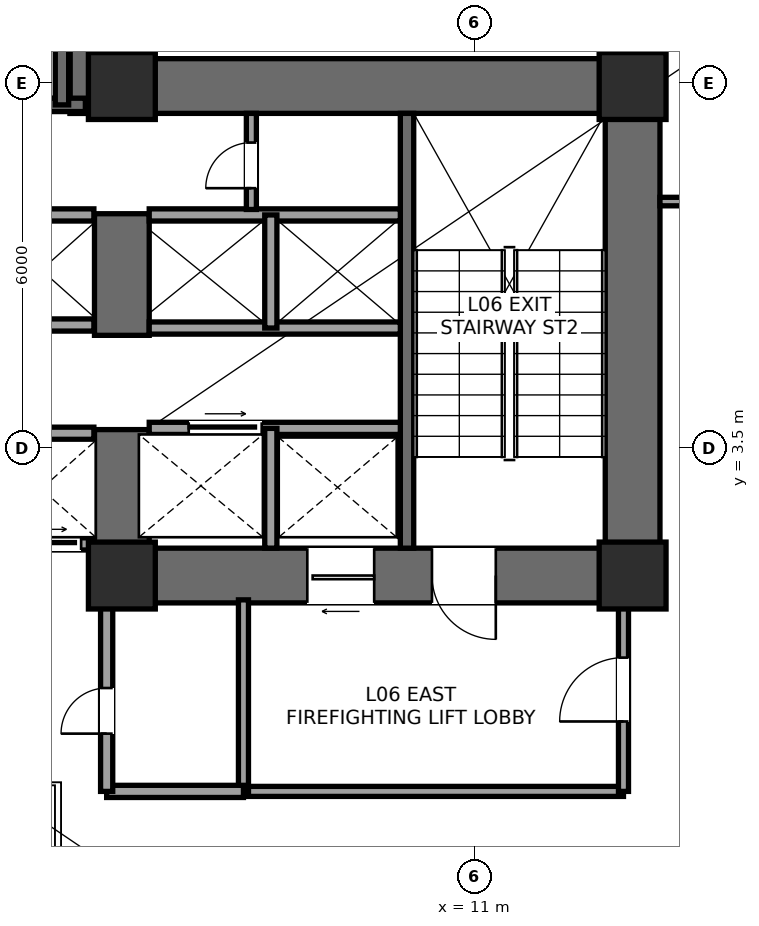
"""IFC4 building model, lengths in metres.
Left out: names, types, materials, properties, quantities, classifications, styles, units other than length and angle.
Written with IfcOpenShell. Run it as: python <this file> out.ifc"""

import sys

from ifc_helpers import new_model, si_unit, direction, frame, frame_2d, origin, origin_2d, place, context, subcontext, project, spatial, rectangle, extrude, element, fill, save


model = new_model("IFC4")
c1 = context("Model", 3, precision=1e-05, world=origin(), true_north=direction((0.0, 1.0)))
c2 = subcontext(c1, "Body", "Model", "MODEL_VIEW")
j1 = project(units=[si_unit("LENGTHUNIT", "METRE"), si_unit("PLANEANGLEUNIT", "RADIAN")], contexts=[c1])
p1 = place(None, origin())
s1 = spatial("IfcSite", under=j1, at=p1, CompositionType="ELEMENT")
p2 = place(p1, origin())
s2 = spatial("IfcBuilding", under=s1, at=p2, CompositionType="ELEMENT")
p3 = place(p2, frame((0.0, 0.0, 27.0)))
s3 = spatial("IfcBuildingStorey", under=s2, at=p3, CompositionType="ELEMENT", Elevation=27.0)
p4 = place(p3, frame((13.6, 0.95, 0.0), z_axis=(0.0, 0.0, 1.0), x_axis=(0.0, 1.0, 0.0)))
e1 = element("IfcWall", 1, at=p4, inside=s3, PredefinedType="SHEAR", context=c2, shape_type="SweptSolid", body=[
    extrude(rectangle(XDim=8.95, YDim=0.9, at=frame_2d((4.475, 0.0))), origin(), (0.0, 0.0, 1.0), 3.6),
])
p5 = place(p3, frame((4.35, 9.45, 0.0), z_axis=(0.0, 0.0, 1.0), x_axis=(1.0, 0.0, 0.0)))
e2 = element("IfcWall", 2, at=p5, inside=s3, PredefinedType="SHEAR", context=c2, shape_type="SweptSolid", body=[
    extrude(rectangle(XDim=9.7, YDim=0.9, at=frame_2d((4.85, 0.0))), origin(), (0.0, 0.0, 1.0), 3.6),
])
p6 = place(p3, frame((14.05, 1.4, 0.0), z_axis=(0.0, 0.0, 1.0), x_axis=(-1.0, 0.0, 0.0)))
e3 = element("IfcWall", 3, at=p6, inside=s3, PredefinedType="SHEAR", context=c2, shape_type="SweptSolid", body=[
    extrude(rectangle(XDim=9.3, YDim=0.9, at=frame_2d((4.65, 0.0))), origin(), (0.0, 0.0, 1.0), 3.6),
])
p7 = place(p6, frame((2.7, 0.0, 0.0)))
e4 = element("IfcOpeningElement", 4, at=p7, cuts=e3, PredefinedType="OPENING", context=c2, shape_type="SweptSolid", body=[
    extrude(rectangle(XDim=1.05, YDim=2.15, at=frame_2d((0.525, 1.075))), frame((0.0, 0.46, 0.0), z_axis=(0.0, -1.0, 0.0), x_axis=(1.0, 0.0, 0.0)), (0.0, 0.0, 1.0), 0.92),
])
p8 = place(p6, frame((4.7, 0.0, 0.0)))
e5 = element("IfcOpeningElement", 5, at=p8, cuts=e3, PredefinedType="OPENING", context=c2, shape_type="SweptSolid", body=[
    extrude(rectangle(XDim=1.1, YDim=2.2, at=frame_2d((0.55, 1.1))), frame((0.0, 0.46, 0.0), z_axis=(0.0, -1.0, 0.0), x_axis=(1.0, 0.0, 0.0)), (0.0, 0.0, 1.0), 0.92),
])
p9 = place(p3, frame((5.2, 0.95, 0.0), z_axis=(0.0, 0.0, 1.0), x_axis=(0.0, 1.0, 0.0)))
e6 = element("IfcWall", 6, at=p9, inside=s3, PredefinedType="SHEAR", context=c2, shape_type="SweptSolid", body=[
    extrude(rectangle(XDim=2.85, YDim=0.9, at=frame_2d((1.425, 0.0))), origin(), (0.0, 0.0, 1.0), 3.6),
])
p10 = place(p3, frame((5.2, 5.35, 0.0), z_axis=(0.0, 0.0, 1.0), x_axis=(0.0, 1.0, 0.0)))
e7 = element("IfcWall", 7, at=p10, inside=s3, PredefinedType="SHEAR", context=c2, shape_type="SweptSolid", body=[
    extrude(rectangle(XDim=2.0, YDim=0.9, at=frame_2d((1.0, 0.0))), origin(), (0.0, 0.0, 1.0), 3.6),
])
p11 = place(p3, frame((9.89, 1.85, 0.0), z_axis=(0.0, 0.0, 1.0), x_axis=(0.0, 1.0, 0.0)))
e8 = element("IfcWall", 8, at=p11, inside=s3, PredefinedType="SHEAR", context=c2, shape_type="SweptSolid", body=[
    extrude(rectangle(XDim=7.15, YDim=0.22, at=frame_2d((3.575, 0.0))), origin(), (0.0, 0.0, 1.0), 3.6),
])
p12 = place(p3, frame((4.8, 9.0, 0.0), z_axis=(0.0, 0.0, 1.0), x_axis=(0.0, 1.0, 0.0)))
e9 = element("IfcWall", 9, at=p12, inside=s3, PredefinedType="SHEAR", context=c2, shape_type="SweptSolid", body=[
    extrude(rectangle(XDim=4.3, YDim=0.9, at=frame_2d((2.15, 0.0))), origin(), (0.0, 0.0, 1.0), 3.6),
])
p13 = place(p3, frame((-4.7, 9.14, 0.0), z_axis=(0.0, 0.0, 1.0), x_axis=(1.0, 0.0, 0.0)))
e10 = element("IfcWall", 10, at=p13, inside=s3, PredefinedType="SHEAR", context=c2, shape_type="SweptSolid", body=[
    extrude(rectangle(XDim=9.3, YDim=0.22, at=frame_2d((4.65, 0.0))), origin(), (0.0, 0.0, 1.0), 3.6),
])
p14 = place(p13, frame((1.15, 0.0, 0.0)))
e11 = element("IfcOpeningElement", 11, at=p14, cuts=e10, PredefinedType="OPENING", context=c2, shape_type="SweptSolid", body=[
    extrude(rectangle(XDim=1.05, YDim=2.15, at=frame_2d((0.525, 1.075))), frame((0.0, 0.12, 0.0), z_axis=(0.0, -1.0, 0.0), x_axis=(1.0, 0.0, 0.0)), (0.0, 0.0, 1.0), 0.24),
])
p15 = place(p3, frame((4.215, 9.14, 0.0), z_axis=(0.0, 0.0, 1.0), x_axis=(0.0, 1.0, 0.0)))
e12 = element("IfcWall", 12, at=p15, inside=s3, PredefinedType="SHEAR", context=c2, shape_type="SweptSolid", body=[
    extrude(rectangle(XDim=3.26, YDim=0.22, at=frame_2d((1.63, 0.0))), origin(), (0.0, 0.0, 1.0), 3.6),
])
for number, where, z_axis, x_axis in (
    (13, (5.2, 1.4, 0.0), (0.0, 0.0, 1.0), (1.0, 0.0, 0.0)),
    (14, (5.2, 9.45, 0.0), (0.0, 0.0, 1.0), (1.0, 0.0, 0.0)),
    (15, (13.6, 1.4, 0.0), (0.0, 0.0, 1.0), (1.0, 0.0, 0.0)),
    (16, (13.6, 9.45, 0.0), (0.0, 0.0, 1.0), (1.0, 0.0, 0.0)),
):
    element("IfcColumn", number, at=place(p3, frame(where, z_axis=z_axis, x_axis=x_axis)), inside=s3, PredefinedType="COLUMN", context=c2, shape_type="SweptSolid", body=[
        extrude(rectangle(XDim=1.1, YDim=1.1, at=origin_2d()), origin(), (0.0, 0.0, 1.0), 3.6),
    ])
p16 = place(p3, frame((7.2, -2.15, 0.0), z_axis=(0.0, 0.0, 1.0), x_axis=(1.0, 0.0, 0.0)))
e17 = element("IfcWall", 17, at=p16, inside=s3, PredefinedType="PARTITIONING", context=c2, shape_type="SweptSolid", body=[
    extrude(rectangle(XDim=6.25, YDim=0.165, at=frame_2d((3.125, 0.0))), origin(), (0.0, 0.0, 1.0), 2.853),
])
p17 = place(p3, frame((7.2, -2.15, 0.0), z_axis=(0.0, 0.0, 1.0), x_axis=(0.0, 1.0, 0.0)))
e18 = element("IfcWall", 18, at=p17, inside=s3, PredefinedType="PARTITIONING", context=c2, shape_type="SweptSolid", body=[
    extrude(rectangle(XDim=3.15, YDim=0.165, at=frame_2d((1.575, 0.0))), origin(), (0.0, 0.0, 1.0), 2.853),
])
p18 = place(p3, frame((13.45, -2.15, 0.0), z_axis=(0.0, 0.0, 1.0), x_axis=(0.0, 1.0, 0.0)))
e19 = element("IfcWall", 19, at=p18, inside=s3, PredefinedType="PARTITIONING", context=c2, shape_type="SweptSolid", body=[
    extrude(rectangle(XDim=3.15, YDim=0.165, at=frame_2d((1.575, 0.0))), origin(), (0.0, 0.0, 1.0), 2.853),
])
p19 = place(p18, frame((1.15, 0.0, 0.0)))
e20 = element("IfcOpeningElement", 20, at=p19, cuts=e19, PredefinedType="OPENING", context=c2, shape_type="SweptSolid", body=[
    extrude(rectangle(XDim=1.05, YDim=2.15, at=frame_2d((0.525, 1.075))), frame((0.0, 0.093, 0.0), z_axis=(0.0, -1.0, 0.0), x_axis=(1.0, 0.0, 0.0)), (0.0, 0.0, 1.0), 0.185),
])
p20 = place(p3, frame((4.95, -2.15, 0.0), z_axis=(0.0, 0.0, 1.0), x_axis=(1.0, 0.0, 0.0)))
e21 = element("IfcWall", 21, at=p20, inside=s3, PredefinedType="SOLIDWALL", context=c2, shape_type="SweptSolid", body=[
    extrude(rectangle(XDim=2.25, YDim=0.2, at=frame_2d((1.125, 0.0))), origin(), (0.0, 0.0, 1.0), 3.4),
])
p21 = place(p3, frame((4.95, -2.15, 0.0), z_axis=(0.0, 0.0, 1.0), x_axis=(0.0, 1.0, 0.0)))
e22 = element("IfcWall", 22, at=p21, inside=s3, PredefinedType="SOLIDWALL", context=c2, shape_type="SweptSolid", body=[
    extrude(rectangle(XDim=3.15, YDim=0.2, at=frame_2d((1.575, 0.0))), origin(), (0.0, 0.0, 1.0), 2.853),
])
p22 = place(p21, frame((0.95, 0.0, 0.0)))
e23 = element("IfcOpeningElement", 23, at=p22, cuts=e22, PredefinedType="OPENING", context=c2, shape_type="SweptSolid", body=[
    extrude(rectangle(XDim=0.75, YDim=2.1, at=frame_2d((0.375, 1.05))), frame((0.0, 0.11, 0.0), z_axis=(0.0, -1.0, 0.0), x_axis=(1.0, 0.0, 0.0)), (0.0, 0.0, 1.0), 0.22),
])
p23 = place(p3, frame((5.65, 3.82, 0.0), z_axis=(0.0, 0.0, 1.0), x_axis=(1.0, 0.0, 0.0)))
e24 = element("IfcWall", 24, at=p23, inside=s3, PredefinedType="SOLIDWALL", context=c2, shape_type="SweptSolid", body=[
    extrude(rectangle(XDim=4.13, YDim=0.2, at=frame_2d((2.065, 0.0))), origin(), (0.0, 0.0, 1.0), 3.4),
])
p24 = place(p23, frame((0.65, 0.0, 0.0)))
e25 = element("IfcOpeningElement", 25, at=p24, cuts=e24, PredefinedType="OPENING", context=c2, shape_type="SweptSolid", body=[
    extrude(rectangle(XDim=1.2, YDim=2.2, at=frame_2d((0.6, 1.1))), frame((0.0, 0.11, 0.0), z_axis=(0.0, -1.0, 0.0), x_axis=(1.0, 0.0, 0.0)), (0.0, 0.0, 1.0), 0.22),
])
p25 = place(p3, frame((7.65, 1.85, 0.0), z_axis=(0.0, 0.0, 1.0), x_axis=(0.0, 1.0, 0.0)))
e26 = element("IfcWall", 26, at=p25, inside=s3, PredefinedType="SOLIDWALL", context=c2, shape_type="SweptSolid", body=[
    extrude(rectangle(XDim=1.97, YDim=0.2, at=frame_2d((0.985, 0.0))), origin(), (0.0, 0.0, 1.0), 3.4),
])
for number, where, z_axis, x_axis in (
    (27, (5.65, 5.47, 0.0), (0.0, 0.0, 1.0), (1.0, 0.0, 0.0)),
    (28, (5.65, 7.33, 0.0), (0.0, 0.0, 1.0), (1.0, 0.0, 0.0)),
):
    element("IfcWall", number, at=place(p3, frame(where, z_axis=z_axis, x_axis=x_axis)), inside=s3, PredefinedType="SOLIDWALL", context=c2, shape_type="SweptSolid", body=[
        extrude(rectangle(XDim=4.13, YDim=0.2, at=frame_2d((2.065, 0.0))), origin(), (0.0, 0.0, 1.0), 3.4),
    ])
p26 = place(p3, frame((7.65, 5.47, 0.0), z_axis=(0.0, 0.0, 1.0), x_axis=(0.0, 1.0, 0.0)))
e29 = element("IfcWall", 29, at=p26, inside=s3, PredefinedType="SOLIDWALL", context=c2, shape_type="SweptSolid", body=[
    extrude(rectangle(XDim=1.86, YDim=0.2, at=frame_2d((0.93, 0.0))), origin(), (0.0, 0.0, 1.0), 3.4),
])
p27 = place(p3, frame((0.88, 1.92, 0.0), z_axis=(0.0, 0.0, 1.0), x_axis=(1.0, 0.0, 0.0)))
e30 = element("IfcWall", 30, at=p27, inside=s3, PredefinedType="SOLIDWALL", context=c2, shape_type="SweptSolid", body=[
    extrude(rectangle(XDim=3.86, YDim=0.2, at=frame_2d((1.93, 0.0))), origin(), (0.0, 0.0, 1.0), 2.39),
])
p28 = place(p27, frame((0.55, 0.0, 0.0)))
e31 = element("IfcOpeningElement", 31, at=p28, cuts=e30, PredefinedType="OPENING", context=c2, shape_type="SweptSolid", body=[
    extrude(rectangle(XDim=1.1, YDim=2.2, at=frame_2d((0.55, 1.1))), frame((0.0, 0.11, 0.0), z_axis=(0.0, -1.0, 0.0), x_axis=(1.0, 0.0, 0.0)), (0.0, 0.0, 1.0), 0.22),
])
p29 = place(p27, frame((2.55, 0.0, 0.0)))
e32 = element("IfcOpeningElement", 32, at=p29, cuts=e30, PredefinedType="OPENING", context=c2, shape_type="SweptSolid", body=[
    extrude(rectangle(XDim=1.1, YDim=2.2, at=frame_2d((0.55, 1.1))), frame((0.0, 0.11, 0.0), z_axis=(0.0, -1.0, 0.0), x_axis=(1.0, 0.0, 0.0)), (0.0, 0.0, 1.0), 0.22),
])
for number, where, z_axis, x_axis in (
    (33, (0.88, 3.74, 0.0), (0.0, 0.0, 1.0), (1.0, 0.0, 0.0)),
    (34, (0.88, 5.52, 0.0), (0.0, 0.0, 1.0), (1.0, 0.0, 0.0)),
    (35, (0.88, 7.33, 0.0), (0.0, 0.0, 1.0), (1.0, 0.0, 0.0)),
):
    element("IfcWall", number, at=place(p3, frame(where, z_axis=z_axis, x_axis=x_axis)), inside=s3, PredefinedType="SOLIDWALL", context=c2, shape_type="SweptSolid", body=[
        extrude(rectangle(XDim=3.86, YDim=0.2, at=frame_2d((1.93, 0.0))), origin(), (0.0, 0.0, 1.0), 3.4),
    ])
p30 = place(p3, frame((7.33, 7.42, 0.0), z_axis=(0.0, 0.0, 1.0), x_axis=(0.0, 1.0, 0.0)))
e36 = element("IfcWall", 36, at=p30, inside=s3, PredefinedType="PARTITIONING", context=c2, shape_type="SweptSolid", body=[
    extrude(rectangle(XDim=1.58, YDim=0.165, at=frame_2d((0.79, 0.0))), origin(), (0.0, 0.0, 1.0), 3.4),
])
p31 = place(p30, frame((0.35, 0.0, 0.0)))
e37 = element("IfcOpeningElement", 37, at=p31, cuts=e36, PredefinedType="OPENING", context=c2, shape_type="SweptSolid", body=[
    extrude(rectangle(XDim=0.75, YDim=2.1, at=frame_2d((0.375, 1.05))), frame((0.0, 0.093, 0.0), z_axis=(0.0, -1.0, 0.0), x_axis=(1.0, 0.0, 0.0)), (0.0, 0.0, 1.0), 0.185),
])
p32 = place(p3, frame((14.05, 7.55, 0.0), z_axis=(0.0, 0.0, 1.0), x_axis=(1.0, 0.0, 0.0)))
e38 = element("IfcWall", 38, at=p32, inside=s3, PredefinedType="PARTITIONING", context=c2, shape_type="SweptSolid", body=[
    extrude(rectangle(XDim=9.052, YDim=0.14, at=frame_2d((4.526, 0.0))), origin(), (0.0, 0.0, 1.0), 3.4),
])
p33 = place(p32, frame((1.2, 0.0, 0.0)))
e39 = element("IfcOpeningElement", 39, at=p33, cuts=e38, PredefinedType="OPENING", context=c2, shape_type="SweptSolid", body=[
    extrude(rectangle(XDim=0.92, YDim=2.15, at=frame_2d((0.46, 1.075))), frame((0.0, 0.08, 0.0), z_axis=(0.0, -1.0, 0.0), x_axis=(1.0, 0.0, 0.0)), (0.0, 0.0, 1.0), 0.16),
])
p34 = place(p7, origin())
e40 = element("IfcDoor", 40, at=p34, inside=s3, OperationType="SINGLE_SWING_LEFT", PredefinedType="DOOR", context=c2, shape_type="SweptSolid", body=[
    extrude(rectangle(XDim=1.05, YDim=2.15, at=frame_2d((0.525, 1.075))), frame((0.0, 0.025, 0.0), z_axis=(0.0, -1.0, 0.0), x_axis=(1.0, 0.0, 0.0)), (0.0, 0.0, 1.0), 0.05),
])
fill(e4, e40)
p35 = place(p19, origin())
e41 = element("IfcDoor", 41, at=p35, inside=s3, OperationType="SINGLE_SWING_LEFT", PredefinedType="DOOR", context=c2, shape_type="SweptSolid", body=[
    extrude(rectangle(XDim=1.05, YDim=2.15, at=frame_2d((0.525, 1.075))), frame((0.0, 0.025, 0.0), z_axis=(0.0, -1.0, 0.0), x_axis=(1.0, 0.0, 0.0)), (0.0, 0.0, 1.0), 0.05),
])
fill(e20, e41)
p36 = place(p22, origin())
e42 = element("IfcDoor", 42, at=p36, inside=s3, OperationType="SINGLE_SWING_LEFT", PredefinedType="DOOR", context=c2, shape_type="SweptSolid", body=[
    extrude(rectangle(XDim=0.75, YDim=2.1, at=frame_2d((0.375, 1.05))), frame((0.0, 0.025, 0.0), z_axis=(0.0, -1.0, 0.0), x_axis=(1.0, 0.0, 0.0)), (0.0, 0.0, 1.0), 0.05),
])
fill(e23, e42)
p37 = place(p8, origin())
e43 = element("IfcDoor", 43, at=p37, inside=s3, OperationType="SLIDING_TO_LEFT", PredefinedType="DOOR", context=c2, shape_type="SweptSolid", body=[
    extrude(rectangle(XDim=1.1, YDim=2.2, at=frame_2d((0.55, 1.1))), frame((0.0, 0.025, 0.0), z_axis=(0.0, -1.0, 0.0), x_axis=(1.0, 0.0, 0.0)), (0.0, 0.0, 1.0), 0.05),
])
fill(e5, e43)
p38 = place(p24, origin())
e44 = element("IfcDoor", 44, at=p38, inside=s3, OperationType="SLIDING_TO_RIGHT", PredefinedType="DOOR", context=c2, shape_type="SweptSolid", body=[
    extrude(rectangle(XDim=1.2, YDim=2.2, at=frame_2d((0.6, 1.1))), frame((0.0, 0.025, 0.0), z_axis=(0.0, -1.0, 0.0), x_axis=(1.0, 0.0, 0.0)), (0.0, 0.0, 1.0), 0.05),
])
fill(e25, e44)
p39 = place(p29, origin())
e45 = element("IfcDoor", 45, at=p39, inside=s3, OperationType="SLIDING_TO_LEFT", PredefinedType="DOOR", context=c2, shape_type="SweptSolid", body=[
    extrude(rectangle(XDim=1.1, YDim=2.2, at=frame_2d((0.55, 1.1))), frame((0.0, 0.025, 0.0), z_axis=(0.0, -1.0, 0.0), x_axis=(1.0, 0.0, 0.0)), (0.0, 0.0, 1.0), 0.05),
])
fill(e32, e45)
p40 = place(p31, origin())
e46 = element("IfcDoor", 46, at=p40, inside=s3, OperationType="SINGLE_SWING_LEFT", PredefinedType="DOOR", context=c2, shape_type="SweptSolid", body=[
    extrude(rectangle(XDim=0.75, YDim=2.1, at=frame_2d((0.375, 1.05))), frame((0.0, 0.025, 0.0), z_axis=(0.0, -1.0, 0.0), x_axis=(1.0, 0.0, 0.0)), (0.0, 0.0, 1.0), 0.05),
])
fill(e37, e46)
save(model, sys.argv[1])
